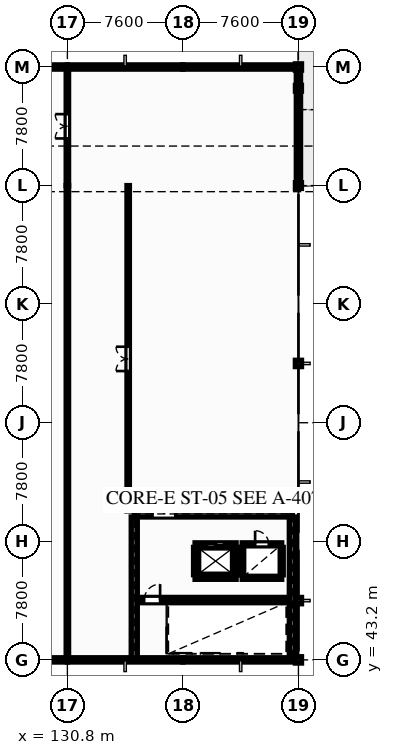
"""IFC4 building model, lengths in metres.
Left out: names, types, materials, properties, quantities, classifications, styles, units other than length and angle.
Written with IfcOpenShell. Run it as: python <this file> out.ifc"""

import sys

from ifc_helpers import new_model, si_unit, direction, frame, frame_2d, origin, origin_2d, place, context, subcontext, project, spatial, polyline, rectangle, i_section, outline, extrude, element, fill, save


model = new_model("IFC4")
c1 = context("Model", 3, precision=1e-05, world=origin(), true_north=direction((0.0, 1.0)))
c2 = subcontext(c1, "Body", "Model", "MODEL_VIEW")
j1 = project(units=[si_unit("LENGTHUNIT", "METRE"), si_unit("PLANEANGLEUNIT", "RADIAN")], contexts=[c1])
p1 = place(None, origin())
s1 = spatial("IfcSite", under=j1, at=p1, CompositionType="ELEMENT")
p2 = place(p1, origin())
s2 = spatial("IfcBuilding", under=s1, at=p2, CompositionType="ELEMENT")
p3 = place(p2, frame((0.0, 0.0, 12.78)))
s3 = spatial("IfcBuildingStorey", under=s2, at=p3, CompositionType="ELEMENT", Elevation=12.78)
for number, where, z_axis, x_axis in (
    (1, (146.0, 47.1, 0.0), (0.0, 0.0, 1.0), (1.0, 0.0, 0.0)),
    (2, (146.0, 62.7, 0.0), (0.0, 0.0, 1.0), (1.0, 0.0, 0.0)),
):
    element("IfcColumn", number, at=place(p3, frame(where, z_axis=z_axis, x_axis=x_axis)), inside=s3, PredefinedType="COLUMN", context=c2, shape_type="SweptSolid", body=[
        extrude(i_section(OverallWidth=0.406, OverallDepth=0.417, WebThickness=0.03, FlangeThickness=0.048, at=origin_2d()), origin(), (0.0, 0.0, 1.0), 8.015),
    ])
for number, where, z_axis, x_axis in (
    (3, (146.0, 43.2, 0.0), (0.0, 0.0, 1.0), (1.0, 0.0, 0.0)),
    (4, (146.0, 82.2, 0.0), (0.0, 0.0, 1.0), (1.0, 0.0, 0.0)),
):
    element("IfcColumn", number, at=place(p3, frame(where, z_axis=z_axis, x_axis=x_axis)), inside=s3, PredefinedType="COLUMN", context=c2, shape_type="SweptSolid", body=[
        extrude(i_section(OverallWidth=0.406, OverallDepth=0.417, WebThickness=0.03, FlangeThickness=0.048, at=origin_2d()), origin(), (0.0, 0.0, 1.0), 9.025),
    ])
for number, where, z_axis, x_axis in (
    (5, (146.0, 74.4, 0.0), (0.0, 0.0, 1.0), (1.0, 0.0, 0.0)),
    (6, (146.0, 80.8, 0.0), (0.0, 0.0, 1.0), (1.0, 0.0, 0.0)),
):
    element("IfcColumn", number, at=place(p3, frame(where, z_axis=z_axis, x_axis=x_axis)), inside=s3, PredefinedType="COLUMN", context=c2, shape_type="SweptSolid", body=[
        extrude(i_section(OverallWidth=0.396, OverallDepth=0.381, WebThickness=0.019, FlangeThickness=0.03, at=origin_2d()), origin(), (0.0, 0.0, 1.0), 3.04),
    ])
p4 = place(p3, frame((123.2, 43.2, 4.714), z_axis=(0.0, 0.0, 1.0), x_axis=(1.0, 0.0, 0.0)))
e7 = element("IfcWall", 7, at=p4, inside=s3, PredefinedType="SOLIDWALL", context=c2, shape_type="SweptSolid", body=[
    extrude(outline(polyline([(0.0, 0.0), (7.6, 0.0), (7.6, 1.617), (0.0, 0.1), (0.0, 0.0)])), frame((0.0, 0.14, 0.0), z_axis=(0.0, -1.0, 0.0), x_axis=(1.0, 0.0, 0.0)), (0.0, 0.0, 1.0), 0.28),
])
p5 = place(p3, frame((130.8, 43.2, 4.714), z_axis=(0.0, 0.0, 1.0), x_axis=(1.0, 0.0, 0.0)))
e8 = element("IfcWall", 8, at=p5, inside=s3, PredefinedType="SOLIDWALL", context=c2, shape_type="SweptSolid", body=[
    extrude(outline(polyline([(0.0, 0.0), (7.6, 0.0), (7.6, 3.134), (0.0, 1.617), (0.0, 0.0)])), frame((0.0, 0.14, 0.0), z_axis=(0.0, -1.0, 0.0), x_axis=(1.0, 0.0, 0.0)), (0.0, 0.0, 1.0), 0.28),
])
p6 = place(p3, frame((138.4, 43.2, 4.714), z_axis=(0.0, 0.0, 1.0), x_axis=(1.0, 0.0, 0.0)))
e9 = element("IfcWall", 9, at=p6, inside=s3, PredefinedType="SOLIDWALL", context=c2, shape_type="SweptSolid", body=[
    extrude(outline(polyline([(0.0, 0.0), (7.6, 0.0), (7.6, 4.651), (0.0, 3.134), (0.0, 0.0)])), frame((0.0, 0.14, 0.0), z_axis=(0.0, -1.0, 0.0), x_axis=(1.0, 0.0, 0.0)), (0.0, 0.0, 1.0), 0.28),
])
p7 = place(p3, frame((123.2, 82.2, 4.714), z_axis=(0.0, 0.0, 1.0), x_axis=(1.0, 0.0, 0.0)))
e10 = element("IfcWall", 10, at=p7, inside=s3, PredefinedType="SOLIDWALL", context=c2, shape_type="SweptSolid", body=[
    extrude(outline(polyline([(0.0, 0.0), (7.6, 0.0), (7.6, 1.617), (0.0, 0.1), (0.0, 0.0)])), frame((0.0, 0.14, 0.0), z_axis=(0.0, -1.0, 0.0), x_axis=(1.0, 0.0, 0.0)), (0.0, 0.0, 1.0), 0.28),
])
p8 = place(p3, frame((130.8, 82.2, 4.714), z_axis=(0.0, 0.0, 1.0), x_axis=(1.0, 0.0, 0.0)))
e11 = element("IfcWall", 11, at=p8, inside=s3, PredefinedType="SOLIDWALL", context=c2, shape_type="SweptSolid", body=[
    extrude(outline(polyline([(0.0, 0.0), (7.6, 0.0), (7.6, 3.134), (0.0, 1.617), (0.0, 0.0)])), frame((0.0, 0.14, 0.0), z_axis=(0.0, -1.0, 0.0), x_axis=(1.0, 0.0, 0.0)), (0.0, 0.0, 1.0), 0.28),
])
p9 = place(p3, frame((138.4, 82.2, 4.714), z_axis=(0.0, 0.0, 1.0), x_axis=(1.0, 0.0, 0.0)))
e12 = element("IfcWall", 12, at=p9, inside=s3, PredefinedType="SOLIDWALL", context=c2, shape_type="SweptSolid", body=[
    extrude(outline(polyline([(0.0, 0.0), (7.6, 0.0), (7.6, 4.651), (0.0, 3.134), (0.0, 0.0)])), frame((0.0, 0.14, 0.0), z_axis=(0.0, -1.0, 0.0), x_axis=(1.0, 0.0, 0.0)), (0.0, 0.0, 1.0), 0.28),
])
p10 = place(p3, frame((146.0, 74.4, 5.57), z_axis=(0.0, 0.0, 1.0), x_axis=(0.0, 1.0, 0.0)))
e13 = element("IfcWall", 13, at=p10, inside=s3, PredefinedType="SOLIDWALL", context=c2, shape_type="SweptSolid", body=[
    extrude(rectangle(XDim=7.8, YDim=0.28, at=frame_2d((3.9, 0.0))), origin(), (0.0, 0.0, 1.0), 3.795),
])
p11 = place(p2, frame((0.0, 0.0, 8.94)))
s4 = spatial("IfcBuildingStorey", under=s2, at=p11, CompositionType="ELEMENT", Elevation=8.94)
p12 = place(p11, frame((146.0, 82.2, 0.0), z_axis=(0.0, 0.0, 1.0), x_axis=(0.0, 1.0, 0.0)))
e14 = element("IfcWall", 14, at=p12, inside=s4, PredefinedType="SOLIDWALL", context=c2, shape_type="SweptSolid", body=[
    extrude(rectangle(XDim=23.8, YDim=0.42, at=frame_2d((11.9, 0.0))), origin(), (0.0, 0.0, 1.0), 9.24),
])
p13 = place(p3, frame((135.2, 52.8, 0.0), z_axis=(0.0, 0.0, 1.0), x_axis=(1.0, 0.0, 0.0)))
e15 = element("IfcWall", 15, at=p13, inside=s3, PredefinedType="SHEAR", context=c2, shape_type="SweptSolid", body=[
    extrude(rectangle(XDim=10.4, YDim=0.4, at=frame_2d((5.2, 0.0))), origin(), (0.0, 0.0, 1.0), 3.42),
])
p14 = place(p13, frame((1.2, 0.0, 0.0)))
e16 = element("IfcOpeningElement", 16, at=p14, cuts=e15, PredefinedType="OPENING", context=c2, shape_type="SweptSolid", body=[
    extrude(rectangle(XDim=1.5, YDim=2.2, at=frame_2d((0.75, 1.1))), frame((0.0, 0.21, 0.0), z_axis=(0.0, -1.0, 0.0), x_axis=(1.0, 0.0, 0.0)), (0.0, 0.0, 1.0), 0.42),
])
for number, where, z_axis, x_axis in (
    (17, (135.2, 43.2, 0.0), (0.0, 0.0, 1.0), (0.0, 1.0, 0.0)),
    (18, (145.6, 43.2, 0.0), (0.0, 0.0, 1.0), (0.0, 1.0, 0.0)),
):
    element("IfcWall", number, at=place(p3, frame(where, z_axis=z_axis, x_axis=x_axis)), inside=s3, PredefinedType="SHEAR", context=c2, shape_type="SweptSolid", body=[
        extrude(rectangle(XDim=9.4, YDim=0.4, at=frame_2d((4.7, 0.0))), origin(), (0.0, 0.0, 1.0), 3.42),
    ])
p15 = place(p3, frame((135.4, 47.135, 0.0), z_axis=(0.0, 0.0, 1.0), x_axis=(1.0, 0.0, 0.0)))
e19 = element("IfcWall", 19, at=p15, inside=s3, PredefinedType="SHEAR", context=c2, shape_type="SweptSolid", body=[
    extrude(rectangle(XDim=10.0, YDim=0.35, at=frame_2d((5.0, 0.0))), origin(), (0.0, 0.0, 1.0), 3.42),
])
p16 = place(p15, frame((0.45, 0.0, 0.0)))
e20 = element("IfcOpeningElement", 20, at=p16, cuts=e19, PredefinedType="OPENING", context=c2, shape_type="SweptSolid", body=[
    extrude(rectangle(XDim=1.05, YDim=2.2, at=frame_2d((0.525, 1.1))), frame((0.0, 0.185, 0.0), z_axis=(0.0, -1.0, 0.0), x_axis=(1.0, 0.0, 0.0)), (0.0, 0.0, 1.0), 0.37),
])
p17 = place(p3, frame((139.2, 48.6, 0.0), z_axis=(0.0, 0.0, 1.0), x_axis=(1.0, 0.0, 0.0)))
e21 = element("IfcWall", 21, at=p17, inside=s3, PredefinedType="PARTITIONING", context=c2, shape_type="SweptSolid", body=[
    extrude(rectangle(XDim=2.7, YDim=0.2, at=frame_2d((1.35, 0.0))), origin(), (0.0, 0.0, 1.0), 3.42),
])
p18 = place(p3, frame((139.2, 50.8, 0.0), z_axis=(0.0, 0.0, 1.0), x_axis=(1.0, 0.0, 0.0)))
e22 = element("IfcWall", 22, at=p18, inside=s3, PredefinedType="PARTITIONING", context=c2, shape_type="SweptSolid", body=[
    extrude(rectangle(XDim=2.7, YDim=0.2, at=frame_2d((1.35, 0.0))), origin(), (0.0, 0.0, 1.0), 3.42),
])
p19 = place(p18, frame((0.8, 0.0, 0.0)))
e23 = element("IfcOpeningElement", 23, at=p19, cuts=e22, PredefinedType="OPENING", context=c2, shape_type="SweptSolid", body=[
    extrude(rectangle(XDim=1.1, YDim=2.15, at=frame_2d((0.55, 1.075))), frame((0.0, 0.11, 0.0), z_axis=(0.0, -1.0, 0.0), x_axis=(1.0, 0.0, 0.0)), (0.0, 0.0, 1.0), 0.22),
])
for number, where, z_axis, x_axis in (
    (24, (139.2, 48.8, 0.0), (0.0, 0.0, 1.0), (0.0, 1.0, 0.0)),
    (25, (141.9, 48.8, 0.0), (0.0, 0.0, 1.0), (0.0, 1.0, 0.0)),
):
    element("IfcWall", number, at=place(p3, frame(where, z_axis=z_axis, x_axis=x_axis)), inside=s3, PredefinedType="PARTITIONING", context=c2, shape_type="SweptSolid", body=[
        extrude(rectangle(XDim=1.8, YDim=0.2, at=frame_2d((0.9, 0.0))), origin(), (0.0, 0.0, 1.0), 3.42),
    ])
p20 = place(p3, frame((142.3, 48.6, 0.0), z_axis=(0.0, 0.0, 1.0), x_axis=(1.0, 0.0, 0.0)))
e26 = element("IfcWall", 26, at=p20, inside=s3, PredefinedType="PARTITIONING", context=c2, shape_type="SweptSolid", body=[
    extrude(rectangle(XDim=2.6, YDim=0.2, at=frame_2d((1.3, 0.0))), origin(), (0.0, 0.0, 1.0), 3.42),
])
p21 = place(p3, frame((142.3, 50.8, 0.0), z_axis=(0.0, 0.0, 1.0), x_axis=(1.0, 0.0, 0.0)))
e27 = element("IfcWall", 27, at=p21, inside=s3, PredefinedType="PARTITIONING", context=c2, shape_type="SweptSolid", body=[
    extrude(rectangle(XDim=2.6, YDim=0.2, at=frame_2d((1.3, 0.0))), origin(), (0.0, 0.0, 1.0), 3.42),
])
p22 = place(p21, frame((0.85, 0.0, 0.0)))
e28 = element("IfcOpeningElement", 28, at=p22, cuts=e27, PredefinedType="OPENING", context=c2, shape_type="SweptSolid", body=[
    extrude(rectangle(XDim=0.9, YDim=2.1, at=frame_2d((0.45, 1.05))), frame((0.0, 0.11, 0.0), z_axis=(0.0, -1.0, 0.0), x_axis=(1.0, 0.0, 0.0)), (0.0, 0.0, 1.0), 0.22),
])
for number, where, z_axis, x_axis in (
    (29, (142.3, 48.8, 0.0), (0.0, 0.0, 1.0), (0.0, 1.0, 0.0)),
    (30, (144.9, 48.8, 0.0), (0.0, 0.0, 1.0), (0.0, 1.0, 0.0)),
):
    element("IfcWall", number, at=place(p3, frame(where, z_axis=z_axis, x_axis=x_axis)), inside=s3, PredefinedType="PARTITIONING", context=c2, shape_type="SweptSolid", body=[
        extrude(rectangle(XDim=1.8, YDim=0.2, at=frame_2d((0.9, 0.0))), origin(), (0.0, 0.0, 1.0), 3.42),
    ])
p23 = place(p3, frame((130.8, 43.2, 0.0), z_axis=(0.0, 0.0, 1.0), x_axis=(0.0, 1.0, 0.0)))
e31 = element("IfcWall", 31, at=p23, inside=s3, PredefinedType="PARTITIONING", context=c2, shape_type="SweptSolid", body=[
    extrude(rectangle(XDim=31.2, YDim=0.16, at=frame_2d((15.6, 0.0))), origin(), (0.0, 0.0, 1.0), 3.42),
])
p24 = place(p3, frame((134.8, 53.0, 0.0), z_axis=(0.0, 0.0, 1.0), x_axis=(0.0, 1.0, 0.0)))
e32 = element("IfcWall", 32, at=p24, inside=s3, PredefinedType="PARTITIONING", context=c2, shape_type="SweptSolid", body=[
    extrude(rectangle(XDim=21.4, YDim=0.16, at=frame_2d((10.7, 0.0))), origin(), (0.0, 0.0, 1.0), 3.42),
])
p25 = place(p24, frame((9.2, 0.0, 0.0)))
e33 = element("IfcOpeningElement", 33, at=p25, cuts=e32, PredefinedType="OPENING", context=c2, shape_type="SweptSolid", body=[
    extrude(rectangle(XDim=1.6, YDim=2.2, at=frame_2d((0.8, 1.1))), frame((0.0, 0.09, 0.0), z_axis=(0.0, -1.0, 0.0), x_axis=(1.0, 0.0, 0.0)), (0.0, 0.0, 1.0), 0.18),
])
p26 = place(p3, frame((130.8, 74.4, 0.0), z_axis=(0.0, 0.0, 1.0), x_axis=(0.0, 1.0, 0.0)))
e34 = element("IfcWall", 34, at=p26, inside=s3, PredefinedType="PARTITIONING", context=c2, shape_type="SweptSolid", body=[
    extrude(rectangle(XDim=7.8, YDim=0.16, at=frame_2d((3.9, 0.0))), origin(), (0.0, 0.0, 1.0), 3.42),
])
p27 = place(p26, frame((3.1, 0.0, 0.0)))
e35 = element("IfcOpeningElement", 35, at=p27, cuts=e34, PredefinedType="OPENING", context=c2, shape_type="SweptSolid", body=[
    extrude(rectangle(XDim=1.6, YDim=2.2, at=frame_2d((0.8, 1.1))), frame((0.0, 0.09, 0.0), z_axis=(0.0, -1.0, 0.0), x_axis=(1.0, 0.0, 0.0)), (0.0, 0.0, 1.0), 0.18),
])
p28 = place(p14, origin())
e36 = element("IfcDoor", 36, at=p28, inside=s3, OperationType="DOUBLE_DOOR_SINGLE_SWING", PredefinedType="DOOR", context=c2, shape_type="SweptSolid", body=[
    extrude(rectangle(XDim=1.5, YDim=2.2, at=frame_2d((0.75, 1.1))), frame((0.0, 0.025, 0.0), z_axis=(0.0, -1.0, 0.0), x_axis=(1.0, 0.0, 0.0)), (0.0, 0.0, 1.0), 0.05),
])
fill(e16, e36)
p29 = place(p16, origin())
e37 = element("IfcDoor", 37, at=p29, inside=s3, OperationType="SINGLE_SWING_RIGHT", PredefinedType="DOOR", context=c2, shape_type="SweptSolid", body=[
    extrude(rectangle(XDim=1.05, YDim=2.2, at=frame_2d((0.525, 1.1))), frame((0.0, 0.025, 0.0), z_axis=(0.0, -1.0, 0.0), x_axis=(1.0, 0.0, 0.0)), (0.0, 0.0, 1.0), 0.05),
])
fill(e20, e37)
p30 = place(p19, origin())
e38 = element("IfcDoor", 38, at=p30, inside=s3, OperationType="SLIDING_TO_LEFT", PredefinedType="DOOR", context=c2, shape_type="SweptSolid", body=[
    extrude(rectangle(XDim=1.1, YDim=2.15, at=frame_2d((0.55, 1.075))), frame((0.0, 0.025, 0.0), z_axis=(0.0, -1.0, 0.0), x_axis=(1.0, 0.0, 0.0)), (0.0, 0.0, 1.0), 0.05),
])
fill(e23, e38)
p31 = place(p22, origin())
e39 = element("IfcDoor", 39, at=p31, inside=s3, OperationType="SINGLE_SWING_LEFT", PredefinedType="DOOR", context=c2, shape_type="SweptSolid", body=[
    extrude(rectangle(XDim=0.9, YDim=2.1, at=frame_2d((0.45, 1.05))), frame((0.0, 0.025, 0.0), z_axis=(0.0, -1.0, 0.0), x_axis=(1.0, 0.0, 0.0)), (0.0, 0.0, 1.0), 0.05),
])
fill(e28, e39)
p32 = place(p25, origin())
e40 = element("IfcDoor", 40, at=p32, inside=s3, OperationType="DOUBLE_DOOR_SINGLE_SWING", PredefinedType="DOOR", context=c2, shape_type="SweptSolid", body=[
    extrude(rectangle(XDim=1.6, YDim=2.2, at=frame_2d((0.8, 1.1))), frame((0.0, 0.025, 0.0), z_axis=(0.0, -1.0, 0.0), x_axis=(1.0, 0.0, 0.0)), (0.0, 0.0, 1.0), 0.05),
])
fill(e33, e40)
p33 = place(p27, origin())
e41 = element("IfcDoor", 41, at=p33, inside=s3, OperationType="DOUBLE_DOOR_SINGLE_SWING", PredefinedType="DOOR", context=c2, shape_type="SweptSolid", body=[
    extrude(rectangle(XDim=1.6, YDim=2.2, at=frame_2d((0.8, 1.1))), frame((0.0, 0.025, 0.0), z_axis=(0.0, -1.0, 0.0), x_axis=(1.0, 0.0, 0.0)), (0.0, 0.0, 1.0), 0.05),
])
fill(e35, e41)
save(model, sys.argv[1])
